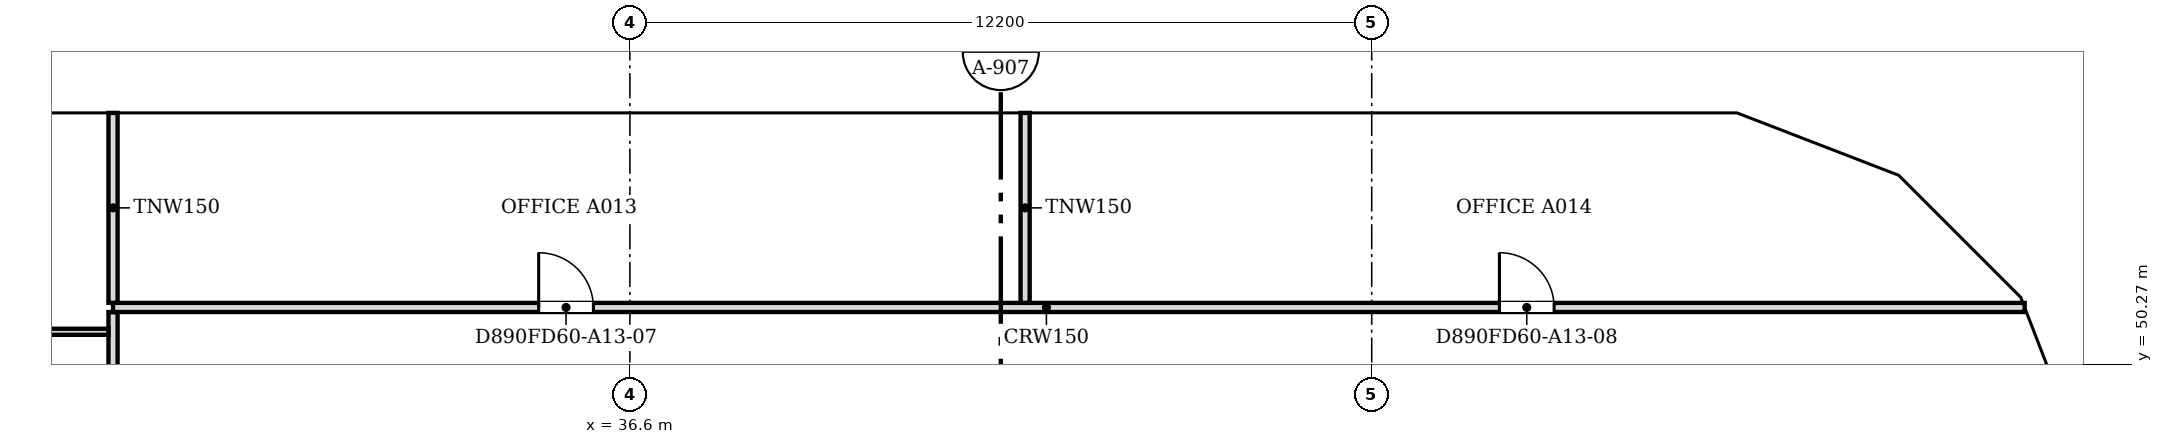
"""IFC4 building model, lengths in metres.
Left out: names, types, materials, properties, quantities, classifications, styles, units other than length and angle.
Written with IfcOpenShell. Run it as: python <this file> out.ifc"""

import sys

from ifc_helpers import new_model, si_unit, direction, frame, frame_2d, origin, place, context, subcontext, project, spatial, polyline, rectangle, outline, extrude, faceted_brep, source, transform, mapped, element, fill, save


model = new_model("IFC4")
c1 = context("Model", 3, precision=1e-05, world=origin(), true_north=direction((0.0, 1.0)))
c2 = subcontext(c1, "Body", "Model", "MODEL_VIEW")
j1 = project(units=[si_unit("LENGTHUNIT", "METRE"), si_unit("PLANEANGLEUNIT", "RADIAN")], contexts=[c1])
p1 = place(None, origin())
s1 = spatial("IfcSite", under=j1, at=p1, CompositionType="ELEMENT")
p2 = place(p1, origin())
s2 = spatial("IfcBuilding", under=s1, at=p2, CompositionType="ELEMENT")
p3 = place(p2, frame((0.0, 0.0, 143.0)))
s3 = spatial("IfcBuildingStorey", under=s2, at=p3, CompositionType="ELEMENT", Elevation=143.0)
m1 = source(origin(), c2, "Body", "Brep", [
    faceted_brep([(2.95, -0.25, 0.0), (3.003, -0.25, 0.068), (3.003, -0.25, 7.532), (2.95, -0.25, 7.6), (0.0, -0.25, 3.8), (0.047, 0.25, 3.86), (2.898, 0.25, 7.532), (2.898, 0.25, 0.068), (0.047, 0.25, 3.74), (2.95, 0.0, 0.0), (2.95, 0.0, 7.6), (0.0, 0.0, 3.8)], [[[0, 1, 2, 3, 4]], [[5, 6, 7, 8]], [[1, 0, 9]], [[10, 3, 2]], [[6, 5, 11, 4, 3, 10]], [[8, 7, 9, 0, 4, 11]], [[8, 11, 5]], [[1, 9, 7, 6, 10, 2]]]),
])
p4 = place(p3, frame((60.75, 48.753, -3.8), z_axis=(0.0, 0.0, 1.0), x_axis=(-0.35992665181, 0.932980602862, 0.0)))
e1 = element("IfcWall", 1, at=p4, inside=s3, PredefinedType="SOLIDWALL", context=c2, shape_type="MappedRepresentation", body=[
    mapped(m1, transform((0.0, 0.0, 0.0), scale=1.0)),
])
m2 = source(origin(), c2, "Body", "SweptSolid", [
    extrude(outline(polyline([(2.75, 6.935), (0.316, 3.8), (2.75, 0.665), (2.75, 6.935)])), frame((0.0, 0.26, 0.0), z_axis=(0.0, -1.0, 0.0), x_axis=(1.0, 0.0, 0.0)), (0.0, 0.0, 1.0), 0.52),
])
p5 = place(p4, origin())
e2 = element("IfcOpeningElement", 2, at=p5, cuts=e1, PredefinedType="OPENING", context=c2, shape_type="MappedRepresentation", body=[
    mapped(m2, transform((0.0, 0.0, 0.0), scale=1.0)),
])
m3 = source(origin(), c2, "Body", "Brep", [
    faceted_brep([(0.053, -0.25, 0.0), (2.997, -0.25, 3.8), (0.053, -0.25, 7.6), (0.0, -0.25, 7.532), (0.0, -0.25, 0.068), (0.106, 0.25, 7.532), (2.944, 0.25, 3.868), (2.944, 0.25, 3.732), (0.106, 0.25, 0.068), (2.997, 0.0, 3.8), (0.053, 0.0, 0.0), (0.053, 0.0, 7.6)], [[[0, 1, 2, 3, 4]], [[5, 6, 7, 8]], [[8, 7, 9, 1, 0, 10]], [[6, 5, 11, 2, 1, 9]], [[3, 2, 11]], [[10, 0, 4]], [[8, 10, 4, 3, 11, 5]], [[9, 7, 6]]]),
])
p6 = place(p3, frame((59.726, 51.469, -3.8), z_axis=(0.0, 0.0, 1.0), x_axis=(-0.707106781187, 0.707106781187, 0.0)))
e3 = element("IfcWall", 3, at=p6, inside=s3, PredefinedType="SOLIDWALL", context=c2, shape_type="MappedRepresentation", body=[
    mapped(m3, transform((0.0, 0.0, 0.0), scale=1.0)),
])
m4 = source(origin(), c2, "Body", "SweptSolid", [
    extrude(outline(polyline([(0.253, 0.666), (2.681, 3.8), (0.253, 6.934), (0.253, 0.666)])), frame((0.0, 0.26, 0.0), z_axis=(0.0, -1.0, 0.0), x_axis=(1.0, 0.0, 0.0)), (0.0, 0.0, 1.0), 0.52),
])
p7 = place(p6, origin())
e4 = element("IfcOpeningElement", 4, at=p7, cuts=e3, PredefinedType="OPENING", context=c2, shape_type="MappedRepresentation", body=[
    mapped(m4, transform((0.0, 0.0, 0.0), scale=1.0)),
])
m5 = source(origin(), c2, "Body", "Brep", [
    faceted_brep([(2.95, -0.25, 0.0), (2.997, -0.25, 0.059), (2.997, -0.25, 7.541), (2.95, -0.25, 7.6), (0.0, -0.25, 3.8), (0.053, 0.25, 3.868), (2.904, 0.25, 7.54), (2.904, 0.25, 0.06), (0.053, 0.25, 3.732), (2.95, 0.0, 0.0), (2.95, 0.0, 7.6), (0.0, 0.0, 3.8)], [[[0, 1, 2, 3, 4]], [[5, 6, 7, 8]], [[1, 0, 9]], [[10, 3, 2]], [[6, 5, 11, 4, 3, 10]], [[8, 7, 9, 0, 4, 11]], [[8, 11, 5]], [[1, 9, 7, 6, 10, 2]]]),
])
p8 = place(p3, frame((57.606, 53.588, -3.8), z_axis=(0.0, 0.0, 1.0), x_axis=(-0.932990326376, 0.359901446078, 0.0)))
e5 = element("IfcWall", 5, at=p8, inside=s3, PredefinedType="SOLIDWALL", context=c2, shape_type="MappedRepresentation", body=[
    mapped(m5, transform((0.0, 0.0, 0.0), scale=1.0)),
])
p9 = place(p8, origin())
e6 = element("IfcOpeningElement", 6, at=p9, cuts=e5, PredefinedType="OPENING", context=c2, shape_type="MappedRepresentation", body=[
    mapped(m2, transform((0.0, 0.0, 0.0), scale=1.0)),
])
m6 = source(origin(), c2, "Body", "Brep", [
    faceted_brep([(0.047, -0.25, 0.0), (3.05, -0.25, 3.8), (0.047, -0.25, 7.6), (0.0, -0.25, 7.54), (0.0, -0.25, 0.06), (0.093, 0.25, 7.541), (3.05, 0.25, 3.8), (0.093, 0.25, 0.059), (0.047, 0.0, 0.0), (0.047, 0.0, 7.6)], [[[0, 1, 2, 3, 4]], [[5, 6, 7]], [[7, 6, 1, 0, 8]], [[6, 5, 9, 2, 1]], [[3, 2, 9]], [[8, 0, 4]], [[7, 8, 4, 3, 9, 5]]]),
])
p10 = place(p3, frame((54.9, 54.65, -3.8), z_axis=(0.0, 0.0, 1.0), x_axis=(-1.0, 0.0, 0.0)))
e7 = element("IfcWall", 7, at=p10, inside=s3, PredefinedType="SOLIDWALL", context=c2, shape_type="MappedRepresentation", body=[
    mapped(m6, transform((0.0, 0.0, 0.0), scale=1.0)),
])
m7 = source(origin(), c2, "Body", "SweptSolid", [
    extrude(outline(polyline([(0.247, 0.656), (2.731, 3.8), (0.247, 6.944), (0.247, 0.656)])), frame((0.0, 0.26, 0.0), z_axis=(0.0, -1.0, 0.0), x_axis=(1.0, 0.0, 0.0)), (0.0, 0.0, 1.0), 0.52),
])
p11 = place(p10, origin())
e8 = element("IfcOpeningElement", 8, at=p11, cuts=e7, PredefinedType="OPENING", context=c2, shape_type="MappedRepresentation", body=[
    mapped(m7, transform((0.0, 0.0, 0.0), scale=1.0)),
])
m8 = source(origin(), c2, "Body", "SweptSolid", [
    extrude(outline(polyline([(3.05, 0.0), (6.1, 3.8), (3.05, 7.6), (0.0, 3.8), (3.05, 0.0)])), frame((0.0, 0.25, 0.0), z_axis=(0.0, -1.0, 0.0), x_axis=(1.0, 0.0, 0.0)), (0.0, 0.0, 1.0), 0.5),
])
p12 = place(p3, frame((51.85, 54.65, -3.8), z_axis=(0.0, 0.0, 1.0), x_axis=(-1.0, 0.0, 0.0)))
e9 = element("IfcWall", 9, at=p12, inside=s3, PredefinedType="SOLIDWALL", context=c2, shape_type="MappedRepresentation", body=[
    mapped(m8, transform((0.0, 0.0, 0.0), scale=1.0)),
])
m9 = source(origin(), c2, "Body", "SweptSolid", [
    extrude(outline(polyline([(3.05, 0.399), (5.78, 3.8), (3.05, 7.201), (0.321, 3.8), (3.05, 0.399)])), frame((0.0, 0.26, 0.0), z_axis=(0.0, -1.0, 0.0), x_axis=(1.0, 0.0, 0.0)), (0.0, 0.0, 1.0), 0.52),
])
p13 = place(p12, origin())
e10 = element("IfcOpeningElement", 10, at=p13, cuts=e9, PredefinedType="OPENING", context=c2, shape_type="MappedRepresentation", body=[
    mapped(m9, transform((0.0, 0.0, 0.0), scale=1.0)),
])
p14 = place(p3, frame((45.75, 54.65, -3.8), z_axis=(0.0, 0.0, 1.0), x_axis=(-1.0, 0.0, 0.0)))
e11 = element("IfcWall", 11, at=p14, inside=s3, PredefinedType="SOLIDWALL", context=c2, shape_type="MappedRepresentation", body=[
    mapped(m8, transform((0.0, 0.0, 0.0), scale=1.0)),
])
p15 = place(p14, origin())
e12 = element("IfcOpeningElement", 12, at=p15, cuts=e11, PredefinedType="OPENING", context=c2, shape_type="MappedRepresentation", body=[
    mapped(m9, transform((0.0, 0.0, 0.0), scale=1.0)),
])
m10 = source(origin(), c2, "Body", "Brep", [
    faceted_brep([(3.05, -0.25, 0.0), (6.1, -0.25, 3.8), (6.1, -0.25, 3.8), (3.05, -0.25, 7.6), (0.0, -0.25, 3.8), (0.0, 0.25, 3.8), (3.05, 0.25, 7.6), (6.1, 0.25, 3.8), (6.1, 0.25, 3.8), (3.05, 0.25, 0.0)], [[[0, 1, 2, 3, 4]], [[5, 6, 7, 8, 9]], [[9, 8, 1, 0]], [[7, 6, 3, 2]], [[6, 5, 4, 3]], [[5, 9, 0, 4]], [[1, 8, 7, 2]]]),
])
p16 = place(p3, frame((39.65, 54.65, -3.8), z_axis=(0.0, 0.0, 1.0), x_axis=(-1.0, 0.0, 0.0)))
e13 = element("IfcWall", 13, at=p16, inside=s3, PredefinedType="SOLIDWALL", context=c2, shape_type="MappedRepresentation", body=[
    mapped(m10, transform((0.0, 0.0, 0.0), scale=1.0)),
])
p17 = place(p16, origin())
e14 = element("IfcOpeningElement", 14, at=p17, cuts=e13, PredefinedType="OPENING", context=c2, shape_type="MappedRepresentation", body=[
    mapped(m9, transform((0.0, 0.0, 0.0), scale=1.0)),
])
p18 = place(p3, frame((33.55, 54.65, -3.8), z_axis=(0.0, 0.0, 1.0), x_axis=(-1.0, 0.0, 0.0)))
e15 = element("IfcWall", 15, at=p18, inside=s3, PredefinedType="SOLIDWALL", context=c2, shape_type="MappedRepresentation", body=[
    mapped(m8, transform((0.0, 0.0, 0.0), scale=1.0)),
])
p19 = place(p18, origin())
e16 = element("IfcOpeningElement", 16, at=p19, cuts=e15, PredefinedType="OPENING", context=c2, shape_type="MappedRepresentation", body=[
    mapped(m9, transform((0.0, 0.0, 0.0), scale=1.0)),
])
p20 = place(p3, frame((27.45, 54.65, -3.8), z_axis=(0.0, 0.0, 1.0), x_axis=(-1.0, 0.0, 0.0)))
e17 = element("IfcWall", 17, at=p20, inside=s3, PredefinedType="SOLIDWALL", context=c2, shape_type="MappedRepresentation", body=[
    mapped(m10, transform((0.0, 0.0, 0.0), scale=1.0)),
])
p21 = place(p20, origin())
e18 = element("IfcOpeningElement", 18, at=p21, cuts=e17, PredefinedType="OPENING", context=c2, shape_type="MappedRepresentation", body=[
    mapped(m9, transform((0.0, 0.0, 0.0), scale=1.0)),
])
p22 = place(p2, frame((0.0, 0.0, 146.8)))
s4 = spatial("IfcBuildingStorey", under=s2, at=p22, CompositionType="ELEMENT", Elevation=146.8)
m11 = source(origin(), c2, "Body", "Brep", [
    faceted_brep([(0.047, -0.25, 0.0), (2.997, -0.25, 3.8), (0.047, -0.25, 7.6), (0.0, -0.25, 7.541), (0.0, -0.25, 0.059), (0.093, 0.25, 7.54), (2.944, 0.25, 3.868), (2.944, 0.25, 3.732), (0.093, 0.25, 0.06), (2.997, 0.0, 3.8), (0.047, 0.0, 0.0), (0.047, 0.0, 7.6)], [[[0, 1, 2, 3, 4]], [[5, 6, 7, 8]], [[8, 7, 9, 1, 0, 10]], [[6, 5, 11, 2, 1, 9]], [[3, 2, 11]], [[10, 0, 4]], [[8, 10, 4, 3, 11, 5]], [[9, 7, 6]]]),
])
p23 = place(p22, frame((60.767, 48.71, -3.8), z_axis=(0.0, 0.0, 1.0), x_axis=(-0.359901446078, 0.932990326376, 0.0)))
e19 = element("IfcWall", 19, at=p23, inside=s4, PredefinedType="SOLIDWALL", context=c2, shape_type="MappedRepresentation", body=[
    mapped(m11, transform((0.0, 0.0, 0.0), scale=1.0)),
])
m12 = source(origin(), c2, "Body", "SweptSolid", [
    extrude(outline(polyline([(0.247, 0.665), (2.681, 3.8), (0.247, 6.935), (0.247, 0.665)])), frame((0.0, 0.26, 0.0), z_axis=(0.0, -1.0, 0.0), x_axis=(1.0, 0.0, 0.0)), (0.0, 0.0, 1.0), 0.52),
])
p24 = place(p23, origin())
e20 = element("IfcOpeningElement", 20, at=p24, cuts=e19, PredefinedType="OPENING", context=c2, shape_type="MappedRepresentation", body=[
    mapped(m12, transform((0.0, 0.0, 0.0), scale=1.0)),
])
m13 = source(origin(), c2, "Body", "Brep", [
    faceted_brep([(2.944, -0.25, 0.0), (2.997, -0.25, 0.068), (2.997, -0.25, 7.532), (2.944, -0.25, 7.6), (0.0, -0.25, 3.8), (0.053, 0.25, 3.868), (2.891, 0.25, 7.532), (2.891, 0.25, 0.068), (0.053, 0.25, 3.732), (2.944, 0.0, 0.0), (2.944, 0.0, 7.6), (0.0, 0.0, 3.8)], [[[0, 1, 2, 3, 4]], [[5, 6, 7, 8]], [[1, 0, 9]], [[10, 3, 2]], [[6, 5, 11, 4, 3, 10]], [[8, 7, 9, 0, 4, 11]], [[8, 11, 5]], [[1, 9, 7, 6, 10, 2]]]),
])
p25 = place(p22, frame((59.688, 51.506, -3.8), z_axis=(0.0, 0.0, 1.0), x_axis=(-0.707106781187, 0.707106781187, 0.0)))
e21 = element("IfcWall", 21, at=p25, inside=s4, PredefinedType="SOLIDWALL", context=c2, shape_type="MappedRepresentation", body=[
    mapped(m13, transform((0.0, 0.0, 0.0), scale=1.0)),
])
m14 = source(origin(), c2, "Body", "SweptSolid", [
    extrude(outline(polyline([(2.744, 6.934), (0.316, 3.8), (2.744, 0.666), (2.744, 6.934)])), frame((0.0, 0.26, 0.0), z_axis=(0.0, -1.0, 0.0), x_axis=(1.0, 0.0, 0.0)), (0.0, 0.0, 1.0), 0.52),
])
p26 = place(p25, origin())
e22 = element("IfcOpeningElement", 22, at=p26, cuts=e21, PredefinedType="OPENING", context=c2, shape_type="MappedRepresentation", body=[
    mapped(m14, transform((0.0, 0.0, 0.0), scale=1.0)),
])
m15 = source(origin(), c2, "Body", "Brep", [
    faceted_brep([(0.053, -0.25, 0.0), (3.003, -0.25, 3.8), (0.053, -0.25, 7.6), (0.0, -0.25, 7.532), (0.0, -0.25, 0.068), (0.106, 0.25, 7.532), (2.957, 0.25, 3.86), (2.957, 0.25, 3.74), (0.106, 0.25, 0.068), (3.003, 0.0, 3.8), (0.053, 0.0, 0.0), (0.053, 0.0, 7.6)], [[[0, 1, 2, 3, 4]], [[5, 6, 7, 8]], [[8, 7, 9, 1, 0, 10]], [[6, 5, 11, 2, 1, 9]], [[3, 2, 11]], [[10, 0, 4]], [[8, 10, 4, 3, 11, 5]], [[9, 7, 6]]]),
])
p27 = place(p22, frame((57.656, 53.569, -3.8), z_axis=(0.0, 0.0, 1.0), x_axis=(-0.933007896601, 0.359855894603, 0.0)))
e23 = element("IfcWall", 23, at=p27, inside=s4, PredefinedType="SOLIDWALL", context=c2, shape_type="MappedRepresentation", body=[
    mapped(m15, transform((0.0, 0.0, 0.0), scale=1.0)),
])
m16 = source(origin(), c2, "Body", "SweptSolid", [
    extrude(outline(polyline([(0.253, 0.665), (2.687, 3.8), (0.253, 6.935), (0.253, 0.665)])), frame((0.0, 0.26, 0.0), z_axis=(0.0, -1.0, 0.0), x_axis=(1.0, 0.0, 0.0)), (0.0, 0.0, 1.0), 0.52),
])
p28 = place(p27, origin())
e24 = element("IfcOpeningElement", 24, at=p28, cuts=e23, PredefinedType="OPENING", context=c2, shape_type="MappedRepresentation", body=[
    mapped(m16, transform((0.0, 0.0, 0.0), scale=1.0)),
])
m17 = source(origin(), c2, "Body", "Brep", [
    faceted_brep([(3.003, -0.25, 0.0), (6.053, -0.25, 3.8), (3.003, -0.25, 7.6), (0.0, -0.25, 3.8), (0.047, 0.25, 3.859), (3.003, 0.25, 7.6), (6.053, 0.25, 3.8), (3.003, 0.25, 0.0), (0.047, 0.25, 3.741), (0.0, 0.0, 3.8)], [[[0, 1, 2, 3]], [[4, 5, 6, 7, 8]], [[7, 6, 1, 0]], [[6, 5, 2, 1]], [[5, 4, 9, 3, 2]], [[8, 7, 0, 3, 9]], [[8, 9, 4]]]),
])
p29 = place(p22, frame((54.854, 54.65, -3.8), z_axis=(0.0, 0.0, 1.0), x_axis=(-1.0, 0.0, 0.0)))
e25 = element("IfcWall", 25, at=p29, inside=s4, PredefinedType="SOLIDWALL", context=c2, shape_type="MappedRepresentation", body=[
    mapped(m17, transform((0.0, 0.0, 0.0), scale=1.0)),
])
m18 = source(origin(), c2, "Body", "SweptSolid", [
    extrude(outline(polyline([(3.005, 0.401), (5.733, 3.8), (3.005, 7.199), (0.319, 3.8), (3.005, 0.401)])), frame((0.0, 0.26, 0.0), z_axis=(0.0, -1.0, 0.0), x_axis=(1.0, 0.0, 0.0)), (0.0, 0.0, 1.0), 0.52),
])
p30 = place(p29, origin())
e26 = element("IfcOpeningElement", 26, at=p30, cuts=e25, PredefinedType="OPENING", context=c2, shape_type="MappedRepresentation", body=[
    mapped(m18, transform((0.0, 0.0, 0.0), scale=1.0)),
])
p31 = place(p22, frame((48.8, 54.65, -3.8), z_axis=(0.0, 0.0, 1.0), x_axis=(-1.0, 0.0, 0.0)))
e27 = element("IfcWall", 27, at=p31, inside=s4, PredefinedType="SOLIDWALL", context=c2, shape_type="MappedRepresentation", body=[
    mapped(m8, transform((0.0, 0.0, 0.0), scale=1.0)),
])
p32 = place(p31, origin())
e28 = element("IfcOpeningElement", 28, at=p32, cuts=e27, PredefinedType="OPENING", context=c2, shape_type="MappedRepresentation", body=[
    mapped(m9, transform((0.0, 0.0, 0.0), scale=1.0)),
])
p33 = place(p22, frame((42.7, 54.65, -3.8), z_axis=(0.0, 0.0, 1.0), x_axis=(-1.0, 0.0, 0.0)))
e29 = element("IfcWall", 29, at=p33, inside=s4, PredefinedType="SOLIDWALL", context=c2, shape_type="MappedRepresentation", body=[
    mapped(m10, transform((0.0, 0.0, 0.0), scale=1.0)),
])
p34 = place(p33, origin())
e30 = element("IfcOpeningElement", 30, at=p34, cuts=e29, PredefinedType="OPENING", context=c2, shape_type="MappedRepresentation", body=[
    mapped(m9, transform((0.0, 0.0, 0.0), scale=1.0)),
])
p35 = place(p22, frame((36.6, 54.65, -3.8), z_axis=(0.0, 0.0, 1.0), x_axis=(-1.0, 0.0, 0.0)))
e31 = element("IfcWall", 31, at=p35, inside=s4, PredefinedType="SOLIDWALL", context=c2, shape_type="MappedRepresentation", body=[
    mapped(m8, transform((0.0, 0.0, 0.0), scale=1.0)),
])
p36 = place(p35, origin())
e32 = element("IfcOpeningElement", 32, at=p36, cuts=e31, PredefinedType="OPENING", context=c2, shape_type="MappedRepresentation", body=[
    mapped(m9, transform((0.0, 0.0, 0.0), scale=1.0)),
])
p37 = place(p22, frame((30.5, 54.65, -3.8), z_axis=(0.0, 0.0, 1.0), x_axis=(-1.0, 0.0, 0.0)))
e33 = element("IfcWall", 33, at=p37, inside=s4, PredefinedType="SOLIDWALL", context=c2, shape_type="MappedRepresentation", body=[
    mapped(m8, transform((0.0, 0.0, 0.0), scale=1.0)),
])
p38 = place(p37, origin())
e34 = element("IfcOpeningElement", 34, at=p38, cuts=e33, PredefinedType="OPENING", context=c2, shape_type="MappedRepresentation", body=[
    mapped(m9, transform((0.0, 0.0, 0.0), scale=1.0)),
])
p39 = place(p3, frame((28.1, 47.376, 0.0), z_axis=(0.0, 0.0, 1.0), x_axis=(0.0, 1.0, 0.0)))
e35 = element("IfcWall", 35, at=p39, inside=s3, PredefinedType="PARTITIONING", context=c2, shape_type="SweptSolid", body=[
    extrude(rectangle(XDim=3.748, YDim=0.15, at=frame_2d((1.874, 0.0))), origin(), (0.0, 0.0, 1.0), 3.067),
])
p40 = place(p3, frame((16.726, 50.8, 0.0), z_axis=(0.0, 0.0, 1.0), x_axis=(1.0, 0.0, 0.0)))
e36 = element("IfcWall", 36, at=p40, inside=s3, PredefinedType="PARTITIONING", context=c2, shape_type="SweptSolid", body=[
    extrude(rectangle(XDim=11.298, YDim=0.1, at=frame_2d((5.649, 0.0))), origin(), (0.0, 0.0, 1.0), 3.067),
])
m19 = source(origin(), c2, "Body", "SweptSolid", [
    extrude(rectangle(XDim=0.9, YDim=2.1, at=frame_2d((0.45, 1.05))), frame((0.0, 0.06, 0.0), z_axis=(0.0, -1.0, 0.0), x_axis=(1.0, 0.0, 0.0)), (0.0, 0.0, 1.0), 0.12),
])
p41 = place(p40, frame((2.3, 0.0, 0.0)))
e37 = element("IfcOpeningElement", 37, at=p41, cuts=e36, PredefinedType="OPENING", context=c2, shape_type="MappedRepresentation", body=[
    mapped(m19, transform((0.0, 0.0, 0.0), scale=1.0)),
])
p42 = place(p40, frame((7.955, 0.0, 0.0)))
e38 = element("IfcOpeningElement", 38, at=p42, cuts=e36, PredefinedType="OPENING", context=c2, shape_type="MappedRepresentation", body=[
    mapped(m19, transform((0.0, 0.0, 0.0), scale=1.0)),
])
p43 = place(p3, frame((28.1, 51.2, 0.0), z_axis=(0.0, 0.0, 1.0), x_axis=(1.0, 0.0, 0.0)))
e39 = element("IfcWall", 39, at=p43, inside=s3, PredefinedType="PARTITIONING", context=c2, shape_type="SweptSolid", body=[
    extrude(rectangle(XDim=31.438, YDim=0.15, at=frame_2d((15.719, 0.0))), origin(), (0.0, 0.0, 1.0), 3.067),
])
m20 = source(origin(), c2, "Body", "SweptSolid", [
    extrude(rectangle(XDim=0.9, YDim=2.1, at=frame_2d((0.45, 1.05))), frame((0.0, 0.085, 0.0), z_axis=(0.0, -1.0, 0.0), x_axis=(1.0, 0.0, 0.0)), (0.0, 0.0, 1.0), 0.17),
])
p44 = place(p43, frame((7.0, 0.0, 0.0)))
e40 = element("IfcOpeningElement", 40, at=p44, cuts=e39, PredefinedType="OPENING", context=c2, shape_type="MappedRepresentation", body=[
    mapped(m20, transform((0.0, 0.0, 0.0), scale=1.0)),
])
p45 = place(p43, frame((22.8, 0.0, 0.0)))
e41 = element("IfcOpeningElement", 41, at=p45, cuts=e39, PredefinedType="OPENING", context=c2, shape_type="MappedRepresentation", body=[
    mapped(m20, transform((0.0, 0.0, 0.0), scale=1.0)),
])
for number, where, z_axis, x_axis in (
    (42, (28.1, 51.276, 0.0), (0.0, 0.0, 1.0), (0.0, 1.0, 0.0)),
    (43, (43.1, 51.276, 0.0), (0.0, 0.0, 1.0), (0.0, 1.0, 0.0)),
):
    element("IfcWall", number, at=place(p3, frame(where, z_axis=z_axis, x_axis=x_axis)), inside=s3, PredefinedType="PARTITIONING", context=c2, shape_type="SweptSolid", body=[
        extrude(rectangle(XDim=3.124, YDim=0.15, at=frame_2d((1.562, 0.0))), origin(), (0.0, 0.0, 1.0), 3.067),
    ])
m21 = source(origin(), c2, "Body", "SweptSolid", [
    extrude(rectangle(XDim=0.9, YDim=2.1, at=frame_2d((0.45, 1.05))), frame((0.0, 0.025, 0.0), z_axis=(0.0, -1.0, 0.0), x_axis=(1.0, 0.0, 0.0)), (0.0, 0.0, 1.0), 0.05),
])
p46 = place(p44, origin())
e44 = element("IfcDoor", 44, at=p46, inside=s3, OperationType="SINGLE_SWING_LEFT", PredefinedType="DOOR", context=c2, shape_type="MappedRepresentation", body=[
    mapped(m21, transform((0.0, 0.0, 0.0), scale=1.0)),
])
fill(e40, e44)
p47 = place(p45, origin())
e45 = element("IfcDoor", 45, at=p47, inside=s3, OperationType="SINGLE_SWING_LEFT", PredefinedType="DOOR", context=c2, shape_type="MappedRepresentation", body=[
    mapped(m21, transform((0.0, 0.0, 0.0), scale=1.0)),
])
fill(e41, e45)
save(model, sys.argv[1])
